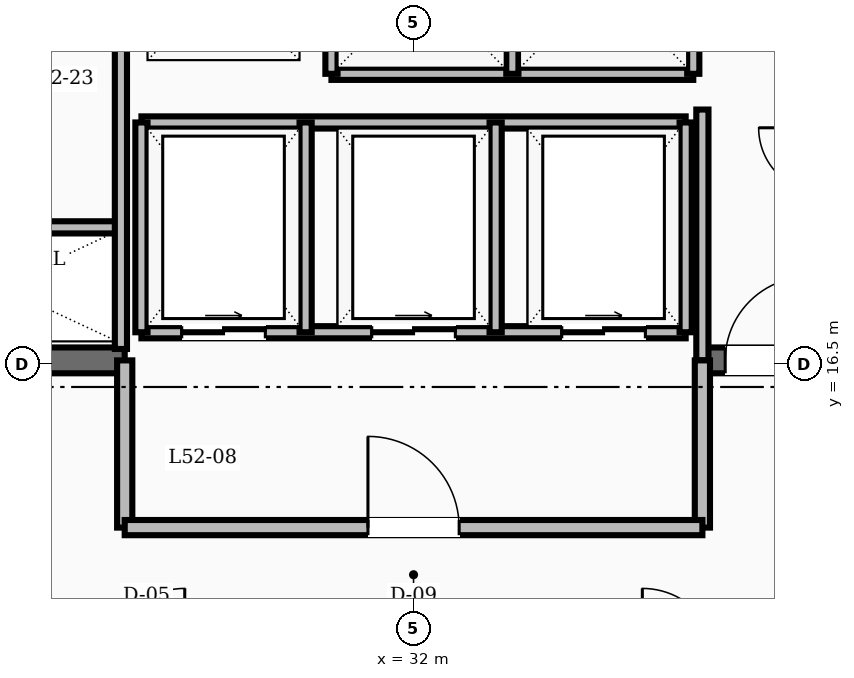
"""IFC4 building model, lengths in metres.
Left out: names, types, materials, properties, quantities, classifications, styles, units other than length and angle.
Written with IfcOpenShell. Run it as: python <this file> out.ifc"""

import sys

from ifc_helpers import new_model, si_unit, direction, frame, frame_2d, origin, place, context, subcontext, project, spatial, rectangle, extrude, element, fill, save


model = new_model("IFC4")
c1 = context("Model", 3, precision=1e-05, world=origin(), true_north=direction((0.0, 1.0)))
c2 = subcontext(c1, "Body", "Model", "MODEL_VIEW")
j1 = project(units=[si_unit("LENGTHUNIT", "METRE"), si_unit("PLANEANGLEUNIT", "RADIAN")], contexts=[c1])
p1 = place(None, origin())
s1 = spatial("IfcSite", under=j1, at=p1, CompositionType="ELEMENT")
p2 = place(p1, origin())
s2 = spatial("IfcBuilding", under=s1, at=p2, CompositionType="ELEMENT")
p3 = place(p2, frame((0.0, 0.0, 200.0)))
s3 = spatial("IfcBuildingStorey", under=s2, at=p3, CompositionType="ELEMENT", Elevation=200.0)
p4 = place(p3, frame((24.97, 16.55, 0.0), z_axis=(0.0, 0.0, 1.0), x_axis=(1.0, 0.0, 0.0)))
e1 = element("IfcWall", 1, at=p4, inside=s3, PredefinedType="SHEAR", context=c2, shape_type="SweptSolid", body=[
    extrude(rectangle(XDim=3.23, YDim=0.34, at=frame_2d((1.615, 0.0))), origin(), (0.0, 0.0, 1.0), 3.6),
])
p5 = place(p3, frame((35.8, 16.55, 0.0), z_axis=(0.0, 0.0, 1.0), x_axis=(1.0, 0.0, 0.0)))
e2 = element("IfcWall", 2, at=p5, inside=s3, PredefinedType="SHEAR", context=c2, shape_type="SweptSolid", body=[
    extrude(rectangle(XDim=3.23, YDim=0.34, at=frame_2d((1.615, 0.0))), origin(), (0.0, 0.0, 1.0), 3.6),
])
p6 = place(p5, frame((0.3, 0.0, 0.0)))
e3 = element("IfcOpeningElement", 3, at=p6, cuts=e2, PredefinedType="OPENING", context=c2, shape_type="SweptSolid", body=[
    extrude(rectangle(XDim=1.1, YDim=2.1, at=frame_2d((0.55, 1.05))), frame((0.0, 0.18, 0.0), z_axis=(0.0, -1.0, 0.0), x_axis=(1.0, 0.0, 0.0)), (0.0, 0.0, 1.0), 0.36),
])
p7 = place(p3, frame((35.8, 16.55, 0.0), z_axis=(0.0, 0.0, 1.0), x_axis=(0.0, 1.0, 0.0)))
e4 = element("IfcWall", 4, at=p7, inside=s3, PredefinedType="SOLIDWALL", context=c2, shape_type="SweptSolid", body=[
    extrude(rectangle(XDim=3.3, YDim=0.16, at=frame_2d((1.65, 0.0))), origin(), (0.0, 0.0, 1.0), 2.75),
])
for number, where, z_axis, x_axis in (
    (5, (28.2, 14.35, 0.0), (0.0, 0.0, 1.0), (0.0, 1.0, 0.0)),
    (6, (35.8, 14.35, 0.0), (0.0, 0.0, 1.0), (0.0, 1.0, 0.0)),
):
    element("IfcWall", number, at=place(p3, frame(where, z_axis=z_axis, x_axis=x_axis)), inside=s3, PredefinedType="SOLIDWALL", context=c2, shape_type="SweptSolid", body=[
        extrude(rectangle(XDim=2.2, YDim=0.2, at=frame_2d((1.1, 0.0))), origin(), (0.0, 0.0, 1.0), 2.75),
    ])
p8 = place(p3, frame((28.2, 14.35, 0.0), z_axis=(0.0, 0.0, 1.0), x_axis=(1.0, 0.0, 0.0)))
e7 = element("IfcWall", 7, at=p8, inside=s3, PredefinedType="SOLIDWALL", context=c2, shape_type="SweptSolid", body=[
    extrude(rectangle(XDim=7.6, YDim=0.2, at=frame_2d((3.8, 0.0))), origin(), (0.0, 0.0, 1.0), 2.75),
])
p9 = place(p8, frame((3.2, 0.0, 0.0)))
e8 = element("IfcOpeningElement", 8, at=p9, cuts=e7, PredefinedType="OPENING", context=c2, shape_type="SweptSolid", body=[
    extrude(rectangle(XDim=1.2, YDim=2.1, at=frame_2d((0.6, 1.05))), frame((0.0, 0.11, 0.0), z_axis=(0.0, -1.0, 0.0), x_axis=(1.0, 0.0, 0.0)), (0.0, 0.0, 1.0), 0.22),
])
p10 = place(p3, frame((30.92, 20.32, 0.0), z_axis=(0.0, 0.0, 1.0), x_axis=(1.0, 0.0, 0.0)))
e9 = element("IfcWall", 9, at=p10, inside=s3, PredefinedType="SOLIDWALL", context=c2, shape_type="SweptSolid", body=[
    extrude(rectangle(XDim=4.76, YDim=0.16, at=frame_2d((2.38, 0.0))), origin(), (0.0, 0.0, 1.0), 2.75),
])
for number, where, z_axis, x_axis in (
    (10, (30.92, 20.32, 0.0), (0.0, 0.0, 1.0), (0.0, 1.0, 0.0)),
    (11, (33.3, 20.32, 0.0), (0.0, 0.0, 1.0), (0.0, 1.0, 0.0)),
    (12, (35.68, 20.32, 0.0), (0.0, 0.0, 1.0), (0.0, 1.0, 0.0)),
):
    element("IfcWall", number, at=place(p3, frame(where, z_axis=z_axis, x_axis=x_axis)), inside=s3, PredefinedType="SOLIDWALL", context=c2, shape_type="SweptSolid", body=[
        extrude(rectangle(XDim=2.36, YDim=0.16, at=frame_2d((1.18, 0.0))), origin(), (0.0, 0.0, 1.0), 2.75),
    ])
p11 = place(p3, frame((28.42, 16.92, 0.0), z_axis=(0.0, 0.0, 1.0), x_axis=(1.0, 0.0, 0.0)))
e13 = element("IfcWall", 13, at=p11, inside=s3, PredefinedType="SOLIDWALL", context=c2, shape_type="SweptSolid", body=[
    extrude(rectangle(XDim=7.16, YDim=0.16, at=frame_2d((3.58, 0.0))), origin(), (0.0, 0.0, 1.0), 2.75),
])
p12 = place(p11, frame((0.53, 0.0, 0.0)))
e14 = element("IfcOpeningElement", 14, at=p12, cuts=e13, PredefinedType="OPENING", context=c2, shape_type="SweptSolid", body=[
    extrude(rectangle(XDim=1.1, YDim=2.15, at=frame_2d((0.55, 1.075))), frame((0.0, 0.09, 0.0), z_axis=(0.0, -1.0, 0.0), x_axis=(1.0, 0.0, 0.0)), (0.0, 0.0, 1.0), 0.18),
])
p13 = place(p11, frame((3.03, 0.0, 0.0)))
e15 = element("IfcOpeningElement", 15, at=p13, cuts=e13, PredefinedType="OPENING", context=c2, shape_type="SweptSolid", body=[
    extrude(rectangle(XDim=1.1, YDim=2.15, at=frame_2d((0.55, 1.075))), frame((0.0, 0.09, 0.0), z_axis=(0.0, -1.0, 0.0), x_axis=(1.0, 0.0, 0.0)), (0.0, 0.0, 1.0), 0.18),
])
p14 = place(p11, frame((5.53, 0.0, 0.0)))
e16 = element("IfcOpeningElement", 16, at=p14, cuts=e13, PredefinedType="OPENING", context=c2, shape_type="SweptSolid", body=[
    extrude(rectangle(XDim=1.1, YDim=2.15, at=frame_2d((0.55, 1.075))), frame((0.0, 0.09, 0.0), z_axis=(0.0, -1.0, 0.0), x_axis=(1.0, 0.0, 0.0)), (0.0, 0.0, 1.0), 0.18),
])
p15 = place(p3, frame((28.42, 19.68, 0.0), z_axis=(0.0, 0.0, 1.0), x_axis=(1.0, 0.0, 0.0)))
e17 = element("IfcWall", 17, at=p15, inside=s3, PredefinedType="SOLIDWALL", context=c2, shape_type="SweptSolid", body=[
    extrude(rectangle(XDim=7.16, YDim=0.16, at=frame_2d((3.58, 0.0))), origin(), (0.0, 0.0, 1.0), 2.75),
])
for number, where, z_axis, x_axis in (
    (18, (28.42, 16.92, 0.0), (0.0, 0.0, 1.0), (0.0, 1.0, 0.0)),
    (19, (30.58, 16.92, 0.0), (0.0, 0.0, 1.0), (0.0, 1.0, 0.0)),
    (20, (33.08, 16.92, 0.0), (0.0, 0.0, 1.0), (0.0, 1.0, 0.0)),
    (21, (35.58, 16.92, 0.0), (0.0, 0.0, 1.0), (0.0, 1.0, 0.0)),
):
    element("IfcWall", number, at=place(p3, frame(where, z_axis=z_axis, x_axis=x_axis)), inside=s3, PredefinedType="SOLIDWALL", context=c2, shape_type="SweptSolid", body=[
        extrude(rectangle(XDim=2.76, YDim=0.16, at=frame_2d((1.38, 0.0))), origin(), (0.0, 0.0, 1.0), 2.75),
    ])
p16 = place(p3, frame((24.95, 18.3, 0.0), z_axis=(0.0, 0.0, 1.0), x_axis=(1.0, 0.0, 0.0)))
e22 = element("IfcWall", 22, at=p16, inside=s3, PredefinedType="SOLIDWALL", context=c2, shape_type="SweptSolid", body=[
    extrude(rectangle(XDim=3.2, YDim=0.16, at=frame_2d((1.6, 0.0))), origin(), (0.0, 0.0, 1.0), 2.75),
])
p17 = place(p3, frame((28.15, 16.7, 0.0), z_axis=(0.0, 0.0, 1.0), x_axis=(0.0, 1.0, 0.0)))
e23 = element("IfcWall", 23, at=p17, inside=s3, PredefinedType="SOLIDWALL", context=c2, shape_type="SweptSolid", body=[
    extrude(rectangle(XDim=6.05, YDim=0.16, at=frame_2d((3.025, 0.0))), origin(), (0.0, 0.0, 1.0), 2.75),
])
p18 = place(p6, origin())
e24 = element("IfcDoor", 24, at=p18, inside=s3, OperationType="SINGLE_SWING_RIGHT", PredefinedType="DOOR", context=c2, shape_type="SweptSolid", body=[
    extrude(rectangle(XDim=1.1, YDim=2.1, at=frame_2d((0.55, 1.05))), frame((0.0, 0.025, 0.0), z_axis=(0.0, -1.0, 0.0), x_axis=(1.0, 0.0, 0.0)), (0.0, 0.0, 1.0), 0.05),
])
fill(e3, e24)
p19 = place(p9, origin())
e25 = element("IfcDoor", 25, at=p19, inside=s3, OperationType="SINGLE_SWING_LEFT", PredefinedType="DOOR", context=c2, shape_type="SweptSolid", body=[
    extrude(rectangle(XDim=1.2, YDim=2.1, at=frame_2d((0.6, 1.05))), frame((0.0, 0.025, 0.0), z_axis=(0.0, -1.0, 0.0), x_axis=(1.0, 0.0, 0.0)), (0.0, 0.0, 1.0), 0.05),
])
fill(e8, e25)
p20 = place(p12, origin())
e26 = element("IfcDoor", 26, at=p20, inside=s3, OperationType="SLIDING_TO_RIGHT", PredefinedType="DOOR", context=c2, shape_type="SweptSolid", body=[
    extrude(rectangle(XDim=1.1, YDim=2.15, at=frame_2d((0.55, 1.075))), frame((0.0, 0.025, 0.0), z_axis=(0.0, -1.0, 0.0), x_axis=(1.0, 0.0, 0.0)), (0.0, 0.0, 1.0), 0.05),
])
fill(e14, e26)
p21 = place(p13, origin())
e27 = element("IfcDoor", 27, at=p21, inside=s3, OperationType="SLIDING_TO_RIGHT", PredefinedType="DOOR", context=c2, shape_type="SweptSolid", body=[
    extrude(rectangle(XDim=1.1, YDim=2.15, at=frame_2d((0.55, 1.075))), frame((0.0, 0.025, 0.0), z_axis=(0.0, -1.0, 0.0), x_axis=(1.0, 0.0, 0.0)), (0.0, 0.0, 1.0), 0.05),
])
fill(e15, e27)
p22 = place(p14, origin())
e28 = element("IfcDoor", 28, at=p22, inside=s3, OperationType="SLIDING_TO_RIGHT", PredefinedType="DOOR", context=c2, shape_type="SweptSolid", body=[
    extrude(rectangle(XDim=1.1, YDim=2.15, at=frame_2d((0.55, 1.075))), frame((0.0, 0.025, 0.0), z_axis=(0.0, -1.0, 0.0), x_axis=(1.0, 0.0, 0.0)), (0.0, 0.0, 1.0), 0.05),
])
fill(e16, e28)
save(model, sys.argv[1])
